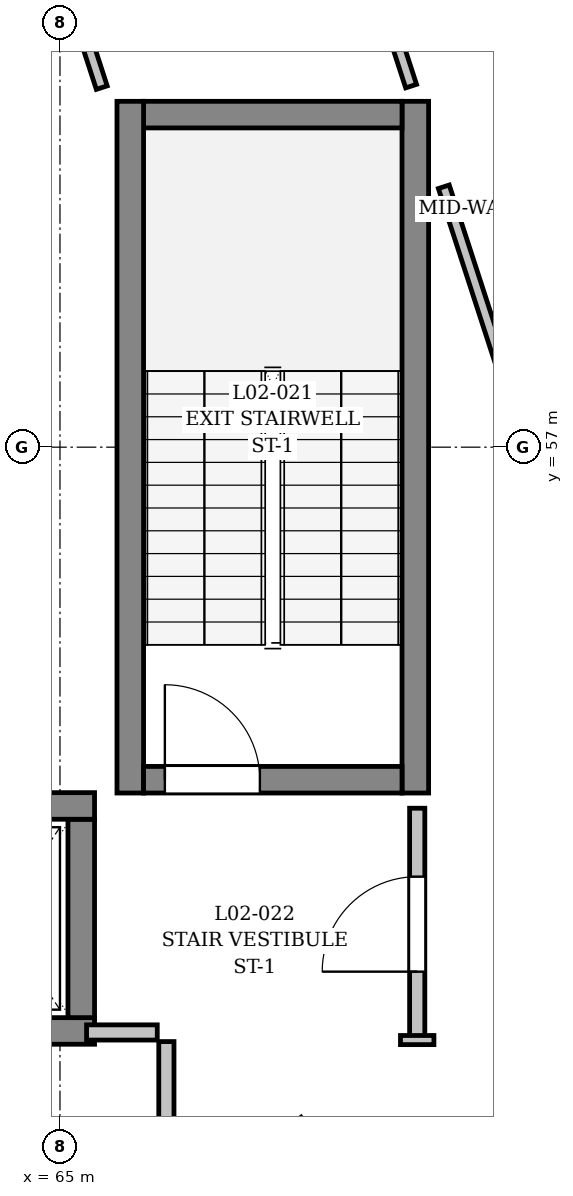
"""IFC4 building model, lengths in metres.
Left out: names, types, materials, properties, quantities, classifications, styles, units other than length and angle.
Written with IfcOpenShell. Run it as: python <this file> out.ifc"""

import sys

from ifc_helpers import new_model, si_unit, direction, frame, frame_2d, origin, place, context, subcontext, project, spatial, rectangle, extrude, element, fill, save


model = new_model("IFC4")
c1 = context("Model", 3, precision=1e-05, world=origin(), true_north=direction((0.0, 1.0)))
c2 = subcontext(c1, "Body", "Model", "MODEL_VIEW")
j1 = project(units=[si_unit("LENGTHUNIT", "METRE"), si_unit("PLANEANGLEUNIT", "RADIAN")], contexts=[c1])
p1 = place(None, origin())
s1 = spatial("IfcSite", under=j1, at=p1, CompositionType="ELEMENT")
p2 = place(p1, origin())
s2 = spatial("IfcBuilding", under=s1, at=p2, CompositionType="ELEMENT")
p3 = place(p2, frame((0.0, 0.0, 5.4)))
s3 = spatial("IfcBuildingStorey", under=s2, at=p3, CompositionType="ELEMENT", Elevation=5.4)
p4 = place(p3, frame((72.119, 49.877, 0.0), z_axis=(0.0, 0.0, 1.0), x_axis=(-0.555600769994, -0.831449207338, 0.0)))
e1 = element("IfcWall", 1, at=p4, inside=s3, PredefinedType="SOLIDWALL", context=c2, shape_type="SweptSolid", body=[
    extrude(rectangle(XDim=6.066, YDim=0.42, at=frame_2d((3.033, 0.0))), origin(), (0.0, 0.0, 1.0), 3.95),
])
p5 = place(p3, frame((69.675, 52.45, 0.0), z_axis=(0.0, 0.0, 1.0), x_axis=(0.0, 1.0, 0.0)))
e2 = element("IfcWall", 2, at=p5, inside=s3, PredefinedType="SHEAR", context=c2, shape_type="SweptSolid", body=[
    extrude(rectangle(XDim=9.1, YDim=0.35, at=frame_2d((4.55, 0.0))), origin(), (0.0, 0.0, 1.0), 4.45),
])
p6 = place(p3, frame((69.5, 61.375, 0.0), z_axis=(0.0, 0.0, 1.0), x_axis=(-1.0, 0.0, 0.0)))
e3 = element("IfcWall", 3, at=p6, inside=s3, PredefinedType="SHEAR", context=c2, shape_type="SweptSolid", body=[
    extrude(rectangle(XDim=3.4, YDim=0.35, at=frame_2d((1.7, 0.0))), origin(), (0.0, 0.0, 1.0), 4.45),
])
p7 = place(p3, frame((65.925, 61.55, 0.0), z_axis=(0.0, 0.0, 1.0), x_axis=(0.0, -1.0, 0.0)))
e4 = element("IfcWall", 4, at=p7, inside=s3, PredefinedType="SHEAR", context=c2, shape_type="SweptSolid", body=[
    extrude(rectangle(XDim=9.1, YDim=0.35, at=frame_2d((4.55, 0.0))), origin(), (0.0, 0.0, 1.0), 4.45),
])
p8 = place(p3, frame((66.1, 52.625, 0.0), z_axis=(0.0, 0.0, 1.0), x_axis=(1.0, 0.0, 0.0)))
e5 = element("IfcWall", 5, at=p8, inside=s3, PredefinedType="SHEAR", context=c2, shape_type="SweptSolid", body=[
    extrude(rectangle(XDim=3.4, YDim=0.35, at=frame_2d((1.7, 0.0))), origin(), (0.0, 0.0, 1.0), 4.45),
])
p9 = place(p8, frame((0.28, 0.0, 0.0)))
e6 = element("IfcOpeningElement", 6, at=p9, cuts=e5, PredefinedType="OPENING", context=c2, shape_type="SweptSolid", body=[
    extrude(rectangle(XDim=1.25, YDim=2.2, at=frame_2d((0.625, 1.1))), frame((0.0, 0.185, 0.0), z_axis=(0.0, -1.0, 0.0), x_axis=(1.0, 0.0, 0.0)), (0.0, 0.0, 1.0), 0.37),
])
p10 = place(p3, frame((62.945, 49.32, 0.0), z_axis=(0.0, 0.0, 1.0), x_axis=(1.0, 0.0, 0.0)))
e7 = element("IfcWall", 7, at=p10, inside=s3, PredefinedType="SHEAR", context=c2, shape_type="SweptSolid", body=[
    extrude(rectangle(XDim=2.51, YDim=0.35, at=frame_2d((1.255, 0.0))), origin(), (0.0, 0.0, 1.0), 4.45),
])
p11 = place(p10, frame((0.705, 0.0, 0.0)))
e8 = element("IfcOpeningElement", 8, at=p11, cuts=e7, PredefinedType="OPENING", context=c2, shape_type="SweptSolid", body=[
    extrude(rectangle(XDim=1.1, YDim=2.2, at=frame_2d((0.55, 1.1))), frame((0.0, 0.185, 0.0), z_axis=(0.0, -1.0, 0.0), x_axis=(1.0, 0.0, 0.0)), (0.0, 0.0, 1.0), 0.37),
])
p12 = place(p3, frame((65.28, 49.495, 0.0), z_axis=(0.0, 0.0, 1.0), x_axis=(0.0, 1.0, 0.0)))
e9 = element("IfcWall", 9, at=p12, inside=s3, PredefinedType="SHEAR", context=c2, shape_type="SweptSolid", body=[
    extrude(rectangle(XDim=2.61, YDim=0.35, at=frame_2d((1.305, 0.0))), origin(), (0.0, 0.0, 1.0), 4.45),
])
p13 = place(p3, frame((65.455, 52.28, 0.0), z_axis=(0.0, 0.0, 1.0), x_axis=(-1.0, 0.0, 0.0)))
e10 = element("IfcWall", 10, at=p13, inside=s3, PredefinedType="SHEAR", context=c2, shape_type="SweptSolid", body=[
    extrude(rectangle(XDim=2.51, YDim=0.35, at=frame_2d((1.255, 0.0))), origin(), (0.0, 0.0, 1.0), 4.45),
])
p14 = place(p3, frame((66.4, 46.32, 0.0), z_axis=(0.0, 0.0, 1.0), x_axis=(0.0, 1.0, 0.0)))
e11 = element("IfcWall", 11, at=p14, inside=s3, PredefinedType="PARTITIONING", context=c2, shape_type="SweptSolid", body=[
    extrude(rectangle(XDim=2.86, YDim=0.2, at=frame_2d((1.43, 0.0))), origin(), (0.0, 0.0, 1.0), 4.45),
])
p15 = place(p3, frame((65.35, 49.3, 0.0), z_axis=(0.0, 0.0, 1.0), x_axis=(1.0, 0.0, 0.0)))
e12 = element("IfcWall", 12, at=p15, inside=s3, PredefinedType="PARTITIONING", context=c2, shape_type="SweptSolid", body=[
    extrude(rectangle(XDim=0.93, YDim=0.2, at=frame_2d((0.465, 0.0))), origin(), (0.0, 0.0, 1.0), 4.45),
])
p16 = place(p3, frame((69.7, 49.2, 0.0), z_axis=(0.0, 0.0, 1.0), x_axis=(0.0, 1.0, 0.0)))
e13 = element("IfcWall", 13, at=p16, inside=s3, PredefinedType="PARTITIONING", context=c2, shape_type="SweptSolid", body=[
    extrude(rectangle(XDim=3.05, YDim=0.2, at=frame_2d((1.525, 0.0))), origin(), (0.0, 0.0, 1.0), 3.84),
])
p17 = place(p16, frame((0.9, 0.0, 0.0)))
e14 = element("IfcOpeningElement", 14, at=p17, cuts=e13, PredefinedType="OPENING", context=c2, shape_type="SweptSolid", body=[
    extrude(rectangle(XDim=1.25, YDim=2.2, at=frame_2d((0.625, 1.1))), frame((0.0, 0.11, 0.0), z_axis=(0.0, -1.0, 0.0), x_axis=(1.0, 0.0, 0.0)), (0.0, 0.0, 1.0), 0.22),
])
p18 = place(p3, frame((68.293, 65.833, 0.0), z_axis=(0.0, 0.0, 1.0), x_axis=(0.308984479346, -0.951067080454, 0.0)))
e15 = element("IfcWall", 15, at=p18, inside=s3, PredefinedType="PARTITIONING", context=c2, shape_type="SweptSolid", body=[
    extrude(rectangle(XDim=4.293, YDim=0.15, at=frame_2d((2.146, 0.0))), origin(), (0.0, 0.0, 1.0), 4.45),
])
p19 = place(p18, frame((1.646, 0.0, 0.0)))
e16 = element("IfcOpeningElement", 16, at=p19, cuts=e15, PredefinedType="OPENING", context=c2, shape_type="SweptSolid", body=[
    extrude(rectangle(XDim=1.0, YDim=2.2, at=frame_2d((0.5, 1.1))), frame((0.0, 0.085, 0.0), z_axis=(0.0, -1.0, 0.0), x_axis=(1.0, 0.0, 0.0)), (0.0, 0.0, 1.0), 0.17),
])
p20 = place(p3, frame((70.05, 60.426, 0.0), z_axis=(0.0, 0.0, 1.0), x_axis=(0.309000246947, -0.951061957701, 0.0)))
e17 = element("IfcWall", 17, at=p20, inside=s3, PredefinedType="PARTITIONING", context=c2, shape_type="SweptSolid", body=[
    extrude(rectangle(XDim=3.602, YDim=0.15, at=frame_2d((1.801, 0.0))), origin(), (0.0, 0.0, 1.0), 4.45),
])
p21 = place(p3, frame((65.55, 61.73, 0.0), z_axis=(0.0, 0.0, 1.0), x_axis=(-0.309032395142, 0.951051512145, 0.0)))
e18 = element("IfcWall", 18, at=p21, inside=s3, PredefinedType="PARTITIONING", context=c2, shape_type="SweptSolid", body=[
    extrude(rectangle(XDim=1.131, YDim=0.15, at=frame_2d((0.566, 0.0))), origin(), (0.0, 0.0, 1.0), 4.45),
])
p22 = place(p3, frame((69.92, 49.2, 0.0), z_axis=(0.0, 0.0, 1.0), x_axis=(-1.0, 0.0, 0.0)))
e19 = element("IfcWall", 19, at=p22, inside=s3, PredefinedType="PARTITIONING", context=c2, shape_type="SweptSolid", body=[
    extrude(rectangle(XDim=0.44, YDim=0.12, at=frame_2d((0.22, 0.0))), origin(), (0.0, 0.0, 1.0), 4.45),
])
p23 = place(p9, origin())
e20 = element("IfcDoor", 20, at=p23, inside=s3, OperationType="SINGLE_SWING_LEFT", PredefinedType="DOOR", context=c2, shape_type="SweptSolid", body=[
    extrude(rectangle(XDim=1.25, YDim=2.2, at=frame_2d((0.625, 1.1))), frame((0.0, 0.025, 0.0), z_axis=(0.0, -1.0, 0.0), x_axis=(1.0, 0.0, 0.0)), (0.0, 0.0, 1.0), 0.05),
])
fill(e6, e20)
p24 = place(p17, origin())
e21 = element("IfcDoor", 21, at=p24, inside=s3, OperationType="SINGLE_SWING_LEFT", PredefinedType="DOOR", context=c2, shape_type="SweptSolid", body=[
    extrude(rectangle(XDim=1.25, YDim=2.2, at=frame_2d((0.625, 1.1))), frame((0.0, 0.025, 0.0), z_axis=(0.0, -1.0, 0.0), x_axis=(1.0, 0.0, 0.0)), (0.0, 0.0, 1.0), 0.05),
])
fill(e14, e21)
save(model, sys.argv[1])
